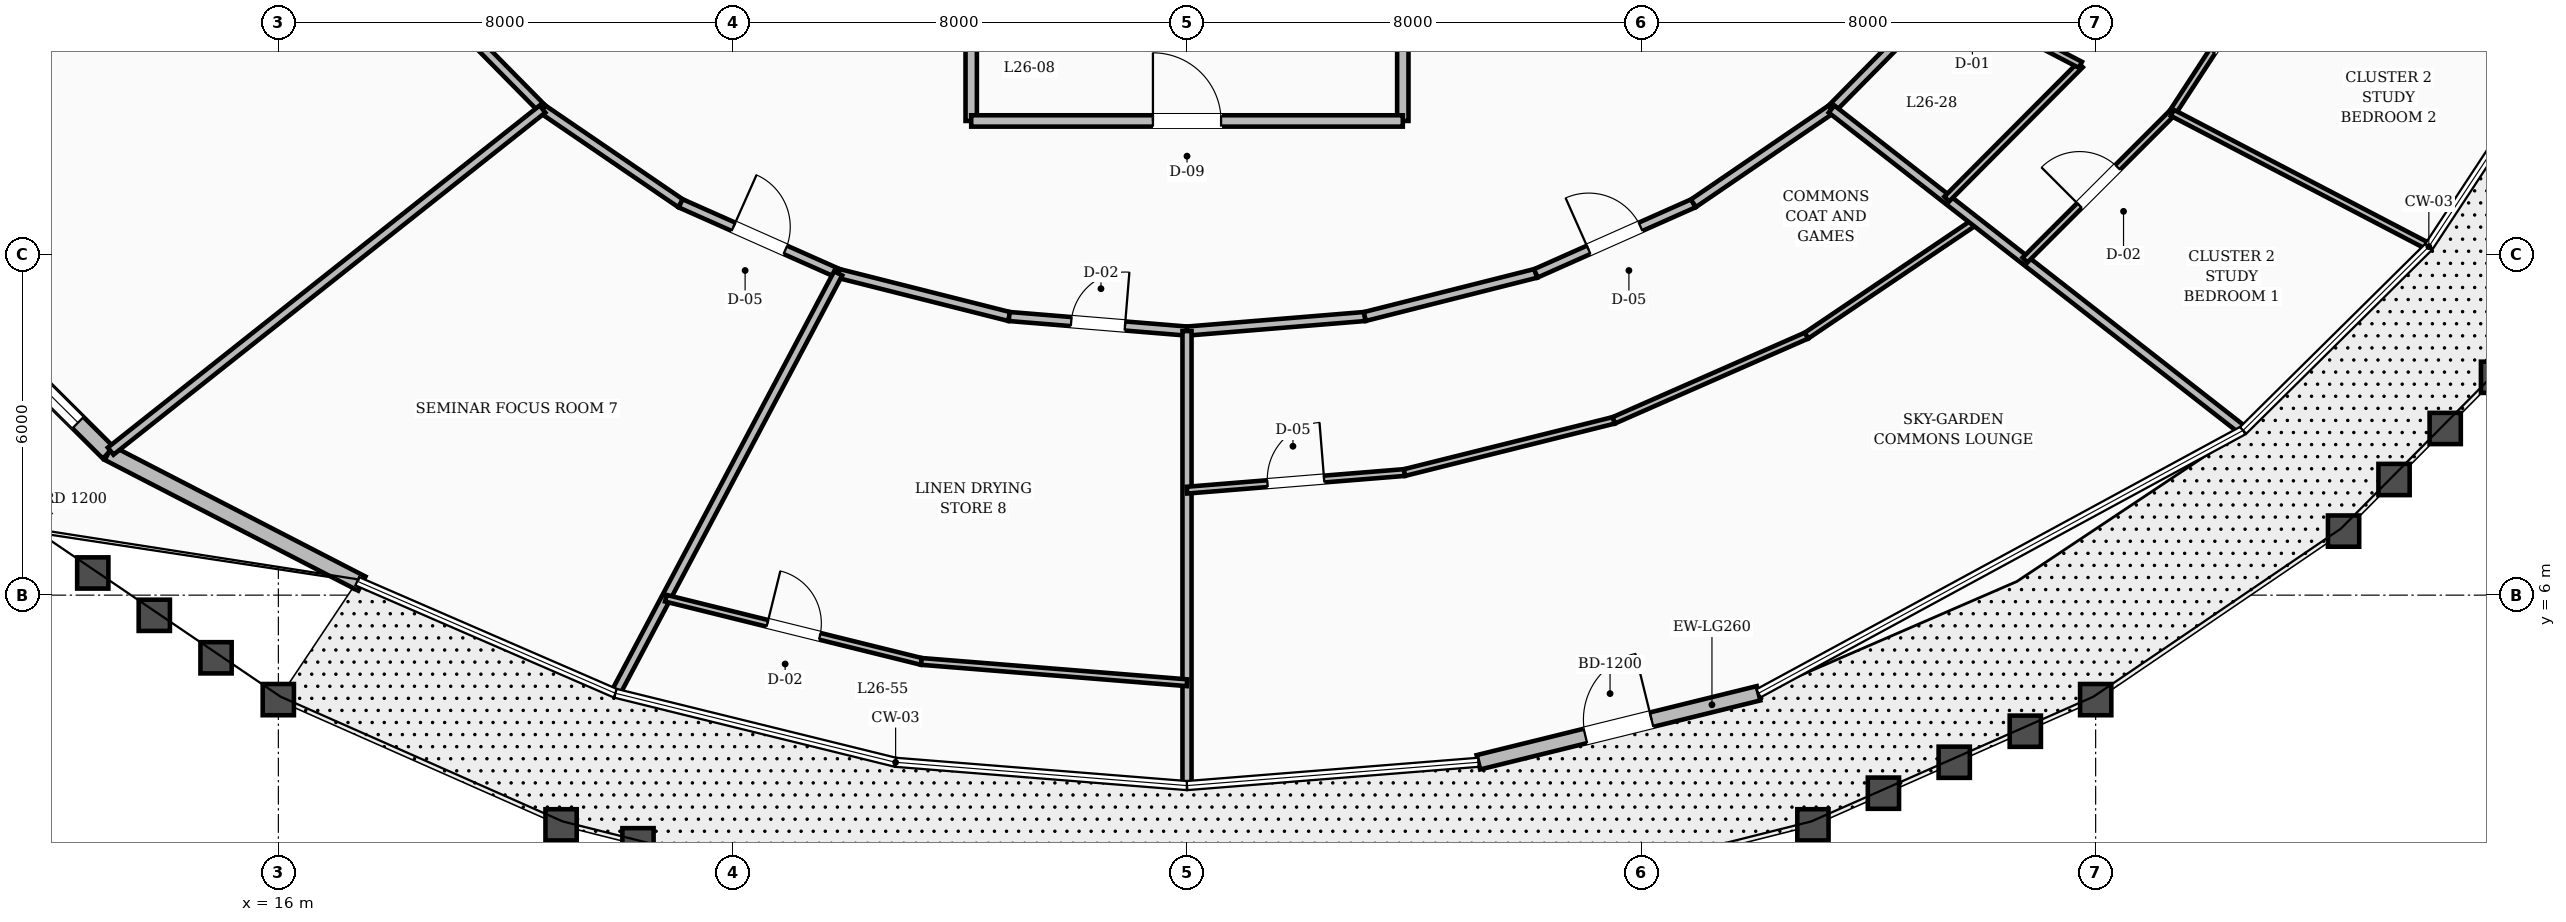
"""IFC4 building model, lengths in metres.
Left out: names, types, materials, properties, quantities, classifications, styles, units other than length and angle.
Written with IfcOpenShell. Run it as: python <this file> out.ifc"""

import sys

from ifc_helpers import new_model, si_unit, direction, frame, frame_2d, origin, place, context, subcontext, project, spatial, rectangle, extrude, element, fill, save


model = new_model("IFC4")
c1 = context("Model", 3, precision=1e-05, world=origin(), true_north=direction((0.0, 1.0)))
c2 = subcontext(c1, "Body", "Model", "MODEL_VIEW")
j1 = project(units=[si_unit("LENGTHUNIT", "METRE"), si_unit("PLANEANGLEUNIT", "RADIAN")], contexts=[c1])
p1 = place(None, origin())
s1 = spatial("IfcSite", under=j1, at=p1, CompositionType="ELEMENT")
p2 = place(p1, origin())
s2 = spatial("IfcBuilding", under=s1, at=p2, CompositionType="ELEMENT")
p3 = place(p2, frame((0.0, 0.0, 102.4)))
s3 = spatial("IfcBuildingStorey", under=s2, at=p3, CompositionType="ELEMENT", Elevation=102.4)
p4 = place(p3, frame((9.667, 11.825, 0.0), z_axis=(0.0, 0.0, 1.0), x_axis=(0.709177055594, -0.705030427583, 0.0)))
e1 = element("IfcWall", 1, at=p4, inside=s3, PredefinedType="STANDARD", context=c2, shape_type="SweptSolid", body=[
    extrude(rectangle(XDim=4.71, YDim=0.28, at=frame_2d((2.355, 0.0))), origin(), (0.0, 0.0, 1.0), 2.67),
])
p5 = place(p4, frame((0.755, 0.0, 0.8)))
e2 = element("IfcOpeningElement", 2, at=p5, cuts=e1, PredefinedType="OPENING", context=c2, shape_type="SweptSolid", body=[
    extrude(rectangle(XDim=3.2, YDim=1.65, at=frame_2d((1.6, 0.825))), frame((0.0, 0.15, 0.0), z_axis=(0.0, -1.0, 0.0), x_axis=(1.0, 0.0, 0.0)), (0.0, 0.0, 1.0), 0.3),
])
p6 = place(p3, frame((13.007, 8.505, 0.0), z_axis=(0.0, 0.0, 1.0), x_axis=(0.888766343183, -0.458360542833, 0.0)))
e3 = element("IfcWall", 3, at=p6, inside=s3, PredefinedType="STANDARD", context=c2, shape_type="SweptSolid", body=[
    extrude(rectangle(XDim=5.022, YDim=0.28, at=frame_2d((2.511, 0.0))), origin(), (0.0, 0.0, 1.0), 2.67),
])
p7 = place(p3, frame((37.131, 3.057, 0.0), z_axis=(0.0, 0.0, 1.0), x_axis=(0.970984503722, 0.239142412659, 0.0)))
e4 = element("IfcWall", 4, at=p7, inside=s3, PredefinedType="STANDARD", context=c2, shape_type="SweptSolid", body=[
    extrude(rectangle(XDim=5.081, YDim=0.26, at=frame_2d((2.541, 0.0))), origin(), (0.0, 0.0, 1.0), 2.67),
])
p8 = place(p7, frame((1.94, 0.0, 0.0)))
e5 = element("IfcOpeningElement", 5, at=p8, cuts=e4, PredefinedType="OPENING", context=c2, shape_type="SweptSolid", body=[
    extrude(rectangle(XDim=1.2, YDim=2.15, at=frame_2d((0.6, 1.075))), frame((0.0, 0.14, 0.0), z_axis=(0.0, -1.0, 0.0), x_axis=(1.0, 0.0, 0.0)), (0.0, 0.0, 1.0), 0.28),
])
for number, where, z_axis, x_axis in (
    (6, (28.2, 14.35, 0.0), (0.0, 0.0, 1.0), (0.0, 1.0, 0.0)),
    (7, (35.8, 14.35, 0.0), (0.0, 0.0, 1.0), (0.0, 1.0, 0.0)),
):
    element("IfcWall", number, at=place(p3, frame(where, z_axis=z_axis, x_axis=x_axis)), inside=s3, PredefinedType="SOLIDWALL", context=c2, shape_type="SweptSolid", body=[
        extrude(rectangle(XDim=2.2, YDim=0.2, at=frame_2d((1.1, 0.0))), origin(), (0.0, 0.0, 1.0), 2.67),
    ])
p9 = place(p3, frame((28.2, 14.35, 0.0), z_axis=(0.0, 0.0, 1.0), x_axis=(1.0, 0.0, 0.0)))
e8 = element("IfcWall", 8, at=p9, inside=s3, PredefinedType="SOLIDWALL", context=c2, shape_type="SweptSolid", body=[
    extrude(rectangle(XDim=7.6, YDim=0.2, at=frame_2d((3.8, 0.0))), origin(), (0.0, 0.0, 1.0), 2.67),
])
p10 = place(p9, frame((3.2, 0.0, 0.0)))
e9 = element("IfcOpeningElement", 9, at=p10, cuts=e8, PredefinedType="OPENING", context=c2, shape_type="SweptSolid", body=[
    extrude(rectangle(XDim=1.2, YDim=2.1, at=frame_2d((0.6, 1.05))), frame((0.0, 0.11, 0.0), z_axis=(0.0, -1.0, 0.0), x_axis=(1.0, 0.0, 0.0)), (0.0, 0.0, 1.0), 0.22),
])
p11 = place(p3, frame((18.655, 16.583, 0.0), z_axis=(0.0, 0.0, 1.0), x_axis=(0.702366174226, -0.711815816981, 0.0)))
e10 = element("IfcWall", 10, at=p11, inside=s3, PredefinedType="SOLIDWALL", context=c2, shape_type="SweptSolid", body=[
    extrude(rectangle(XDim=2.842, YDim=0.16, at=frame_2d((1.421, 0.0))), origin(), (0.0, 0.0, 1.0), 2.67),
])
p12 = place(p3, frame((20.651, 14.56, 0.0), z_axis=(0.0, 0.0, 1.0), x_axis=(0.825929039072, -0.563774088104, 0.0)))
e11 = element("IfcWall", 11, at=p12, inside=s3, PredefinedType="SOLIDWALL", context=c2, shape_type="SweptSolid", body=[
    extrude(rectangle(XDim=2.945, YDim=0.16, at=frame_2d((1.472, 0.0))), origin(), (0.0, 0.0, 1.0), 2.67),
])
p13 = place(p3, frame((23.083, 12.9, 0.0), z_axis=(0.0, 0.0, 1.0), x_axis=(0.913768445178, -0.406235434936, 0.0)))
e12 = element("IfcWall", 12, at=p13, inside=s3, PredefinedType="SOLIDWALL", context=c2, shape_type="SweptSolid", body=[
    extrude(rectangle(XDim=3.037, YDim=0.16, at=frame_2d((1.519, 0.0))), origin(), (0.0, 0.0, 1.0), 2.67),
])
p14 = place(p13, frame((1.018, 0.0, 0.0)))
e13 = element("IfcOpeningElement", 13, at=p14, cuts=e12, PredefinedType="OPENING", context=c2, shape_type="SweptSolid", body=[
    extrude(rectangle(XDim=1.0, YDim=2.1, at=frame_2d((0.5, 1.05))), frame((0.0, 0.09, 0.0), z_axis=(0.0, -1.0, 0.0), x_axis=(1.0, 0.0, 0.0)), (0.0, 0.0, 1.0), 0.18),
])
p15 = place(p3, frame((25.858, 11.666, 0.0), z_axis=(0.0, 0.0, 1.0), x_axis=(0.969608333194, -0.244662380029, 0.0)))
e14 = element("IfcWall", 14, at=p15, inside=s3, PredefinedType="SOLIDWALL", context=c2, shape_type="SweptSolid", body=[
    extrude(rectangle(XDim=3.105, YDim=0.16, at=frame_2d((1.553, 0.0))), origin(), (0.0, 0.0, 1.0), 2.67),
])
p16 = place(p3, frame((28.869, 10.906, 0.0), z_axis=(0.0, 0.0, 1.0), x_axis=(0.996658973252, -0.081675522876, 0.0)))
e15 = element("IfcWall", 15, at=p16, inside=s3, PredefinedType="SOLIDWALL", context=c2, shape_type="SweptSolid", body=[
    extrude(rectangle(XDim=3.142, YDim=0.16, at=frame_2d((1.571, 0.0))), origin(), (0.0, 0.0, 1.0), 2.67),
])
p17 = place(p16, frame((1.096, 0.0, 0.0)))
e16 = element("IfcOpeningElement", 16, at=p17, cuts=e15, PredefinedType="OPENING", context=c2, shape_type="SweptSolid", body=[
    extrude(rectangle(XDim=0.95, YDim=2.1, at=frame_2d((0.475, 1.05))), frame((0.0, 0.09, 0.0), z_axis=(0.0, -1.0, 0.0), x_axis=(1.0, 0.0, 0.0)), (0.0, 0.0, 1.0), 0.18),
])
p18 = place(p3, frame((32.0, 10.65, 0.0), z_axis=(0.0, 0.0, 1.0), x_axis=(0.996658973252, 0.081675522876, 0.0)))
e17 = element("IfcWall", 17, at=p18, inside=s3, PredefinedType="SOLIDWALL", context=c2, shape_type="SweptSolid", body=[
    extrude(rectangle(XDim=3.142, YDim=0.16, at=frame_2d((1.571, 0.0))), origin(), (0.0, 0.0, 1.0), 2.67),
])
p19 = place(p3, frame((35.131, 10.906, 0.0), z_axis=(0.0, 0.0, 1.0), x_axis=(0.969608333194, 0.244662380029, 0.0)))
e18 = element("IfcWall", 18, at=p19, inside=s3, PredefinedType="SOLIDWALL", context=c2, shape_type="SweptSolid", body=[
    extrude(rectangle(XDim=3.105, YDim=0.16, at=frame_2d((1.553, 0.0))), origin(), (0.0, 0.0, 1.0), 2.67),
])
p20 = place(p3, frame((38.142, 11.666, 0.0), z_axis=(0.0, 0.0, 1.0), x_axis=(0.913768445178, 0.406235434936, 0.0)))
e19 = element("IfcWall", 19, at=p20, inside=s3, PredefinedType="SOLIDWALL", context=c2, shape_type="SweptSolid", body=[
    extrude(rectangle(XDim=3.037, YDim=0.16, at=frame_2d((1.519, 0.0))), origin(), (0.0, 0.0, 1.0), 2.67),
])
p21 = place(p20, frame((1.018, 0.0, 0.0)))
e20 = element("IfcOpeningElement", 20, at=p21, cuts=e19, PredefinedType="OPENING", context=c2, shape_type="SweptSolid", body=[
    extrude(rectangle(XDim=1.0, YDim=2.1, at=frame_2d((0.5, 1.05))), frame((0.0, 0.09, 0.0), z_axis=(0.0, -1.0, 0.0), x_axis=(1.0, 0.0, 0.0)), (0.0, 0.0, 1.0), 0.18),
])
p22 = place(p3, frame((40.917, 12.9, 0.0), z_axis=(0.0, 0.0, 1.0), x_axis=(0.825929039072, 0.563774088104, 0.0)))
e21 = element("IfcWall", 21, at=p22, inside=s3, PredefinedType="SOLIDWALL", context=c2, shape_type="SweptSolid", body=[
    extrude(rectangle(XDim=2.945, YDim=0.16, at=frame_2d((1.472, 0.0))), origin(), (0.0, 0.0, 1.0), 2.67),
])
p23 = place(p3, frame((43.349, 14.56, 0.0), z_axis=(0.0, 0.0, 1.0), x_axis=(0.702366174226, 0.711815816981, 0.0)))
e22 = element("IfcWall", 22, at=p23, inside=s3, PredefinedType="SOLIDWALL", context=c2, shape_type="SweptSolid", body=[
    extrude(rectangle(XDim=2.842, YDim=0.16, at=frame_2d((1.421, 0.0))), origin(), (0.0, 0.0, 1.0), 2.67),
])
p24 = place(p3, frame((32.0, 10.65, 0.0), z_axis=(0.0, 0.0, 1.0), x_axis=(0.0, -1.0, 0.0)))
e23 = element("IfcWall", 23, at=p24, inside=s3, PredefinedType="SOLIDWALL", context=c2, shape_type="SweptSolid", body=[
    extrude(rectangle(XDim=7.954, YDim=0.16, at=frame_2d((3.977, 0.0))), origin(), (0.0, 0.0, 1.0), 2.67),
])
p25 = place(p3, frame((32.0, 7.849, 0.0), z_axis=(0.0, 0.0, 1.0), x_axis=(0.996735820556, 0.080732298491, 0.0)))
e24 = element("IfcWall", 24, at=p25, inside=s3, PredefinedType="PARTITIONING", context=c2, shape_type="SweptSolid", body=[
    extrude(rectangle(XDim=3.844, YDim=0.12, at=frame_2d((1.922, 0.0))), origin(), (0.0, 0.0, 1.0), 2.67),
])
p26 = place(p25, frame((1.422, 0.0, 0.0)))
e25 = element("IfcOpeningElement", 25, at=p26, cuts=e24, PredefinedType="OPENING", context=c2, shape_type="SweptSolid", body=[
    extrude(rectangle(XDim=1.0, YDim=2.1, at=frame_2d((0.5, 1.05))), frame((0.0, 0.07, 0.0), z_axis=(0.0, -1.0, 0.0), x_axis=(1.0, 0.0, 0.0)), (0.0, 0.0, 1.0), 0.14),
])
p27 = place(p3, frame((35.831, 8.159, 0.0), z_axis=(0.0, 0.0, 1.0), x_axis=(0.970252092483, 0.242096833998, 0.0)))
e26 = element("IfcWall", 26, at=p27, inside=s3, PredefinedType="PARTITIONING", context=c2, shape_type="SweptSolid", body=[
    extrude(rectangle(XDim=3.797, YDim=0.12, at=frame_2d((1.898, 0.0))), origin(), (0.0, 0.0, 1.0), 2.67),
])
p28 = place(p3, frame((39.515, 9.078, 0.0), z_axis=(0.0, 0.0, 1.0), x_axis=(0.915427595413, 0.402482692245, 0.0)))
e27 = element("IfcWall", 27, at=p28, inside=s3, PredefinedType="PARTITIONING", context=c2, shape_type="SweptSolid", body=[
    extrude(rectangle(XDim=3.709, YDim=0.12, at=frame_2d((1.854, 0.0))), origin(), (0.0, 0.0, 1.0), 2.67),
])
p29 = place(p3, frame((42.91, 10.571, 0.0), z_axis=(0.0, 0.0, 1.0), x_axis=(0.828866805351, 0.559445992914, 0.0)))
e28 = element("IfcWall", 28, at=p29, inside=s3, PredefinedType="PARTITIONING", context=c2, shape_type="SweptSolid", body=[
    extrude(rectangle(XDim=3.59, YDim=0.12, at=frame_2d((1.795, 0.0))), origin(), (0.0, 0.0, 1.0), 2.67),
])
p30 = place(p3, frame((43.349, 14.56, 0.0), z_axis=(0.0, 0.0, 1.0), x_axis=(0.788161960412, -0.615467890438, 0.0)))
e29 = element("IfcWall", 29, at=p30, inside=s3, PredefinedType="SOLIDWALL", context=c2, shape_type="SweptSolid", body=[
    extrude(rectangle(XDim=9.145, YDim=0.16, at=frame_2d((4.573, 0.0))), origin(), (0.0, 0.0, 1.0), 2.67),
])
p31 = place(p3, frame((45.378, 12.976, 0.0), z_axis=(0.0, 0.0, 1.0), x_axis=(0.705640823882, 0.708569705584, 0.0)))
e30 = element("IfcWall", 30, at=p31, inside=s3, PredefinedType="PARTITIONING", context=c2, shape_type="SweptSolid", body=[
    extrude(rectangle(XDim=3.334, YDim=0.12, at=frame_2d((1.667, 0.0))), origin(), (0.0, 0.0, 1.0), 2.67),
])
p32 = place(p3, frame((45.345, 16.583, 0.0), z_axis=(0.0, 0.0, 1.0), x_axis=(0.88658322861, -0.462569106997, 0.0)))
e31 = element("IfcWall", 31, at=p32, inside=s3, PredefinedType="PARTITIONING", context=c2, shape_type="SweptSolid", body=[
    extrude(rectangle(XDim=2.691, YDim=0.12, at=frame_2d((1.346, 0.0))), origin(), (0.0, 0.0, 1.0), 2.67),
])
p33 = place(p32, frame((0.44, 0.0, 0.0)))
e32 = element("IfcOpeningElement", 32, at=p33, cuts=e31, PredefinedType="OPENING", context=c2, shape_type="SweptSolid", body=[
    extrude(rectangle(XDim=0.86, YDim=2.1, at=frame_2d((0.43, 1.05))), frame((0.0, 0.07, 0.0), z_axis=(0.0, -1.0, 0.0), x_axis=(1.0, 0.0, 0.0)), (0.0, 0.0, 1.0), 0.14),
])
p34 = place(p3, frame((46.755, 11.9, 0.0), z_axis=(0.0, 0.0, 1.0), x_axis=(0.707406184173, 0.706807251373, 0.0)))
e33 = element("IfcWall", 33, at=p34, inside=s3, PredefinedType="PARTITIONING", context=c2, shape_type="SweptSolid", body=[
    extrude(rectangle(XDim=3.669, YDim=0.12, at=frame_2d((1.834, 0.0))), origin(), (0.0, 0.0, 1.0), 2.67),
])
p35 = place(p34, frame((1.359, 0.0, 0.0)))
e34 = element("IfcOpeningElement", 34, at=p35, cuts=e33, PredefinedType="OPENING", context=c2, shape_type="SweptSolid", body=[
    extrude(rectangle(XDim=0.95, YDim=2.1, at=frame_2d((0.475, 1.05))), frame((0.0, 0.07, 0.0), z_axis=(0.0, -1.0, 0.0), x_axis=(1.0, 0.0, 0.0)), (0.0, 0.0, 1.0), 0.14),
])
p36 = place(p3, frame((49.351, 14.493, 0.0), z_axis=(0.0, 0.0, 1.0), x_axis=(0.546023127997, 0.837770101933, 0.0)))
e35 = element("IfcWall", 35, at=p36, inside=s3, PredefinedType="PARTITIONING", context=c2, shape_type="SweptSolid", body=[
    extrude(rectangle(XDim=3.531, YDim=0.12, at=frame_2d((1.766, 0.0))), origin(), (0.0, 0.0, 1.0), 2.67),
])
p37 = place(p36, frame((1.291, 0.0, 0.0)))
e36 = element("IfcOpeningElement", 36, at=p37, cuts=e35, PredefinedType="OPENING", context=c2, shape_type="SweptSolid", body=[
    extrude(rectangle(XDim=0.95, YDim=2.1, at=frame_2d((0.475, 1.05))), frame((0.0, 0.07, 0.0), z_axis=(0.0, -1.0, 0.0), x_axis=(1.0, 0.0, 0.0)), (0.0, 0.0, 1.0), 0.14),
])
p38 = place(p3, frame((49.351, 14.493, 0.0), z_axis=(0.0, 0.0, 1.0), x_axis=(0.886579668451, -0.462575930512, 0.0)))
e37 = element("IfcWall", 37, at=p38, inside=s3, PredefinedType="PARTITIONING", context=c2, shape_type="SweptSolid", body=[
    extrude(rectangle(XDim=5.045, YDim=0.12, at=frame_2d((2.522, 0.0))), origin(), (0.0, 0.0, 1.0), 2.67),
])
p39 = place(p3, frame((20.651, 14.56, 0.0), z_axis=(0.0, 0.0, 1.0), x_axis=(-0.783825840098, -0.620980718215, 0.0)))
e38 = element("IfcWall", 38, at=p39, inside=s3, PredefinedType="SOLIDWALL", context=c2, shape_type="SweptSolid", body=[
    extrude(rectangle(XDim=9.701, YDim=0.16, at=frame_2d((4.851, 0.0))), origin(), (0.0, 0.0, 1.0), 2.67),
])
p40 = place(p3, frame((25.858, 11.666, 0.0), z_axis=(0.0, 0.0, 1.0), x_axis=(-0.468598051713, -0.883411492981, 0.0)))
e39 = element("IfcWall", 39, at=p40, inside=s3, PredefinedType="SOLIDWALL", context=c2, shape_type="SweptSolid", body=[
    extrude(rectangle(XDim=8.32, YDim=0.16, at=frame_2d((4.16, 0.0))), origin(), (0.0, 0.0, 1.0), 2.67),
])
p41 = place(p3, frame((22.823, 5.945, 0.0), z_axis=(0.0, 0.0, 1.0), x_axis=(0.970765284747, -0.240030752052, 0.0)))
e40 = element("IfcWall", 40, at=p41, inside=s3, PredefinedType="PARTITIONING", context=c2, shape_type="SweptSolid", body=[
    extrude(rectangle(XDim=4.634, YDim=0.12, at=frame_2d((2.317, 0.0))), origin(), (0.0, 0.0, 1.0), 2.67),
])
p42 = place(p41, frame((1.842, 0.0, 0.0)))
e41 = element("IfcOpeningElement", 41, at=p42, cuts=e40, PredefinedType="OPENING", context=c2, shape_type="SweptSolid", body=[
    extrude(rectangle(XDim=0.95, YDim=2.1, at=frame_2d((0.475, 1.05))), frame((0.0, 0.07, 0.0), z_axis=(0.0, -1.0, 0.0), x_axis=(1.0, 0.0, 0.0)), (0.0, 0.0, 1.0), 0.14),
])
p43 = place(p3, frame((27.322, 4.833, 0.0), z_axis=(0.0, 0.0, 1.0), x_axis=(0.996794403682, -0.080005729718, 0.0)))
e42 = element("IfcWall", 42, at=p43, inside=s3, PredefinedType="PARTITIONING", context=c2, shape_type="SweptSolid", body=[
    extrude(rectangle(XDim=4.693, YDim=0.12, at=frame_2d((2.347, 0.0))), origin(), (0.0, 0.0, 1.0), 2.67),
])
p44 = place(p5, origin())
e43 = element("IfcWindow", 43, at=p44, inside=s3, PartitioningType="SINGLE_PANEL", PredefinedType="WINDOW", context=c2, shape_type="SweptSolid", body=[
    extrude(rectangle(XDim=3.2, YDim=1.65, at=frame_2d((1.6, 0.825))), frame((0.0, 0.03, 0.0), z_axis=(0.0, -1.0, 0.0), x_axis=(1.0, 0.0, 0.0)), (0.0, 0.0, 1.0), 0.06),
])
fill(e2, e43)
p45 = place(p8, origin())
e44 = element("IfcDoor", 44, at=p45, inside=s3, OperationType="SINGLE_SWING_RIGHT", PredefinedType="DOOR", context=c2, shape_type="SweptSolid", body=[
    extrude(rectangle(XDim=1.2, YDim=2.15, at=frame_2d((0.6, 1.075))), frame((0.0, 0.025, 0.0), z_axis=(0.0, -1.0, 0.0), x_axis=(1.0, 0.0, 0.0)), (0.0, 0.0, 1.0), 0.05),
])
fill(e5, e44)
p46 = place(p10, origin())
e45 = element("IfcDoor", 45, at=p46, inside=s3, OperationType="SINGLE_SWING_LEFT", PredefinedType="DOOR", context=c2, shape_type="SweptSolid", body=[
    extrude(rectangle(XDim=1.2, YDim=2.1, at=frame_2d((0.6, 1.05))), frame((0.0, 0.025, 0.0), z_axis=(0.0, -1.0, 0.0), x_axis=(1.0, 0.0, 0.0)), (0.0, 0.0, 1.0), 0.05),
])
fill(e9, e45)
p47 = place(p21, origin())
e46 = element("IfcDoor", 46, at=p47, inside=s3, OperationType="SINGLE_SWING_LEFT", PredefinedType="DOOR", context=c2, shape_type="SweptSolid", body=[
    extrude(rectangle(XDim=1.0, YDim=2.1, at=frame_2d((0.5, 1.05))), frame((0.0, 0.025, 0.0), z_axis=(0.0, -1.0, 0.0), x_axis=(1.0, 0.0, 0.0)), (0.0, 0.0, 1.0), 0.05),
])
fill(e20, e46)
p48 = place(p26, origin())
e47 = element("IfcDoor", 47, at=p48, inside=s3, OperationType="SINGLE_SWING_RIGHT", PredefinedType="DOOR", context=c2, shape_type="SweptSolid", body=[
    extrude(rectangle(XDim=1.0, YDim=2.1, at=frame_2d((0.5, 1.05))), frame((0.0, 0.025, 0.0), z_axis=(0.0, -1.0, 0.0), x_axis=(1.0, 0.0, 0.0)), (0.0, 0.0, 1.0), 0.05),
])
fill(e25, e47)
p49 = place(p35, origin())
e48 = element("IfcDoor", 48, at=p49, inside=s3, OperationType="SINGLE_SWING_LEFT", PredefinedType="DOOR", context=c2, shape_type="SweptSolid", body=[
    extrude(rectangle(XDim=0.95, YDim=2.1, at=frame_2d((0.475, 1.05))), frame((0.0, 0.025, 0.0), z_axis=(0.0, -1.0, 0.0), x_axis=(1.0, 0.0, 0.0)), (0.0, 0.0, 1.0), 0.05),
])
fill(e34, e48)
p50 = place(p14, origin())
e49 = element("IfcDoor", 49, at=p50, inside=s3, OperationType="SINGLE_SWING_LEFT", PredefinedType="DOOR", context=c2, shape_type="SweptSolid", body=[
    extrude(rectangle(XDim=1.0, YDim=2.1, at=frame_2d((0.5, 1.05))), frame((0.0, 0.025, 0.0), z_axis=(0.0, -1.0, 0.0), x_axis=(1.0, 0.0, 0.0)), (0.0, 0.0, 1.0), 0.05),
])
fill(e13, e49)
p51 = place(p17, origin())
e50 = element("IfcDoor", 50, at=p51, inside=s3, OperationType="SINGLE_SWING_RIGHT", PredefinedType="DOOR", context=c2, shape_type="SweptSolid", body=[
    extrude(rectangle(XDim=0.95, YDim=2.1, at=frame_2d((0.475, 1.05))), frame((0.0, 0.025, 0.0), z_axis=(0.0, -1.0, 0.0), x_axis=(1.0, 0.0, 0.0)), (0.0, 0.0, 1.0), 0.05),
])
fill(e16, e50)
p52 = place(p42, origin())
e51 = element("IfcDoor", 51, at=p52, inside=s3, OperationType="SINGLE_SWING_LEFT", PredefinedType="DOOR", context=c2, shape_type="SweptSolid", body=[
    extrude(rectangle(XDim=0.95, YDim=2.1, at=frame_2d((0.475, 1.05))), frame((0.0, 0.025, 0.0), z_axis=(0.0, -1.0, 0.0), x_axis=(1.0, 0.0, 0.0)), (0.0, 0.0, 1.0), 0.05),
])
fill(e41, e51)
save(model, sys.argv[1])
